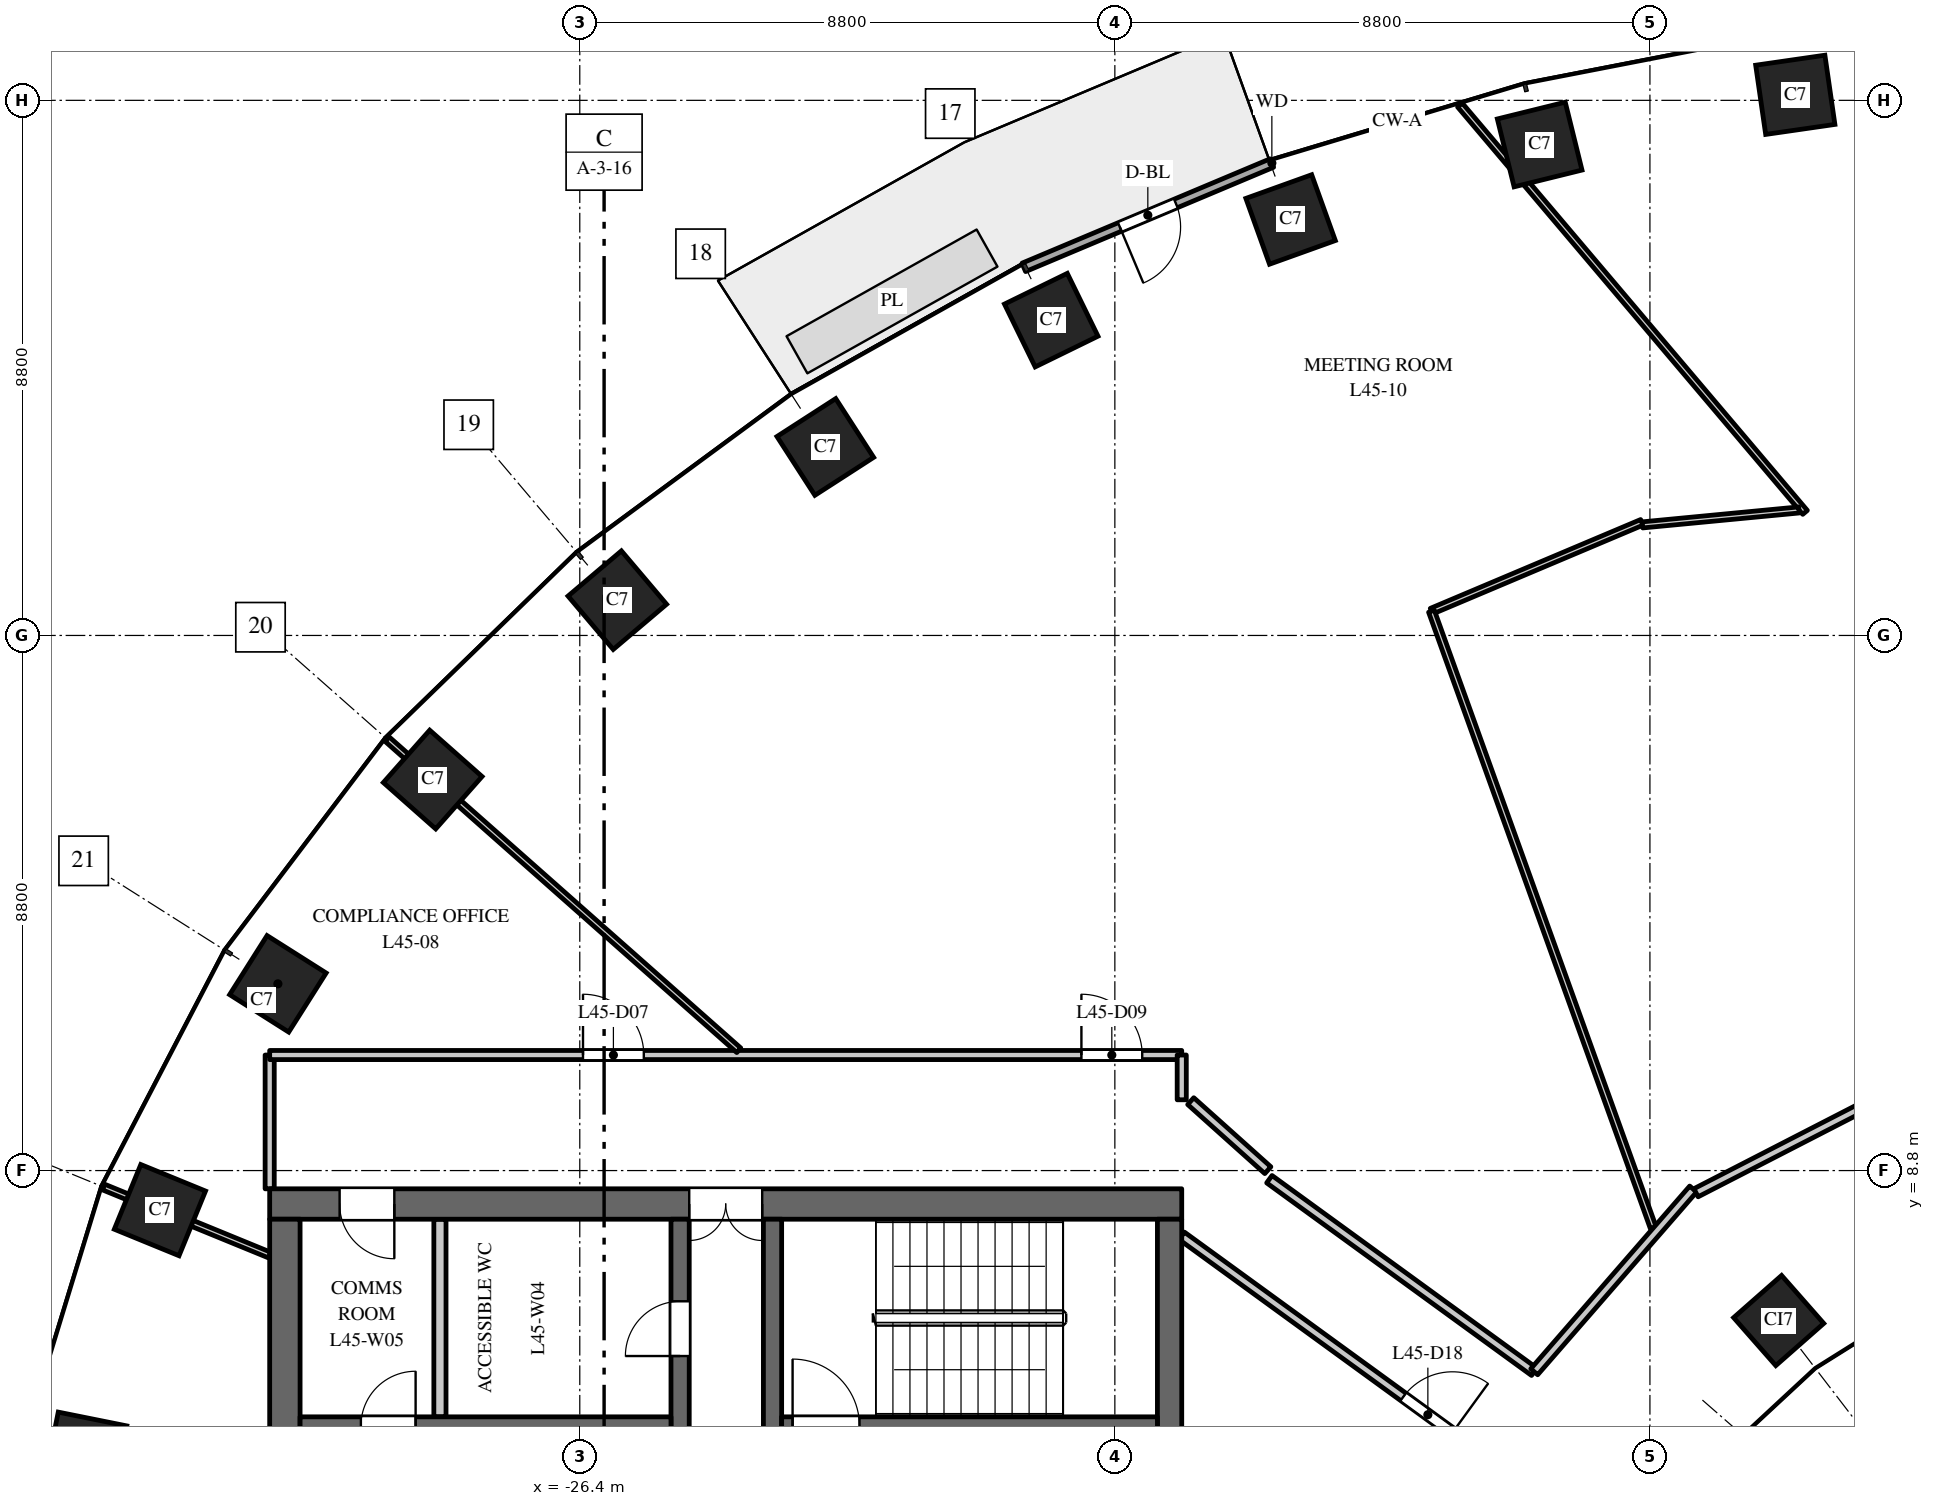
"""IFC4 building model, lengths in metres.
Left out: names, types, materials, properties, quantities, classifications, styles, units other than length and angle.
Written with IfcOpenShell. Run it as: python <this file> out.ifc"""

import sys

from ifc_helpers import new_model, si_unit, direction, frame, frame_2d, origin, origin_2d, place, context, subcontext, project, spatial, rectangle, extrude, element, fill, save


model = new_model("IFC4")
c1 = context("Model", 3, precision=1e-05, world=origin(), true_north=direction((0.0, 1.0)))
c2 = subcontext(c1, "Body", "Model", "MODEL_VIEW")
j1 = project(units=[si_unit("LENGTHUNIT", "METRE"), si_unit("PLANEANGLEUNIT", "RADIAN")], contexts=[c1])
p1 = place(None, origin())
s1 = spatial("IfcSite", under=j1, at=p1, CompositionType="ELEMENT")
p2 = place(p1, origin())
s2 = spatial("IfcBuilding", under=s1, at=p2, CompositionType="ELEMENT")
p3 = place(p2, frame((0.0, 0.0, 194.0)))
s3 = spatial("IfcBuildingStorey", under=s2, at=p3, CompositionType="ELEMENT", Elevation=194.0)
for number, where, z_axis, x_axis in (
    (1, (-6.409, 26.491, 0.0), (0.0, 0.0, 1.0), (-0.99, -0.143, 0.0)),
    (2, (-10.613, 25.674, 0.0), (0.0, 0.0, 1.0), (-0.971, -0.24, 0.0)),
    (3, (-14.709, 24.441, 0.0), (0.0, 0.0, 1.0), (-0.941, -0.338, 0.0)),
    (4, (-18.646, 22.785, 0.0), (0.0, 0.0, 1.0), (-0.898, -0.439, 0.0)),
    (5, (-22.362, 20.7, 0.0), (0.0, 0.0, 1.0), (-0.84, -0.542, 0.0)),
    (6, (-25.783, 18.18, 0.0), (0.0, 0.0, 1.0), (-0.763, -0.646, 0.0)),
    (7, (-28.819, 15.23, 0.0), (0.0, 0.0, 1.0), (-0.663, -0.749, 0.0)),
    (8, (-31.365, 11.871, 0.0), (0.0, 0.0, 1.0), (-0.535, -0.845, 0.0)),
    (9, (-33.305, 8.149, 0.0), (0.0, 0.0, 1.0), (-0.379, -0.925, 0.0)),
    (10, (-34.527, 4.151, 0.0), (0.0, 0.0, 1.0), (-0.197, -0.98, 0.0)),
):
    element("IfcColumn", number, at=place(p3, frame(where, z_axis=z_axis, x_axis=x_axis)), inside=s3, PredefinedType="COLUMN", context=c2, shape_type="SweptSolid", body=[
        extrude(rectangle(XDim=1.15, YDim=1.15, at=origin_2d()), origin(), (0.0, 0.0, 1.0), 4.0),
    ])
p4 = place(p3, frame((-6.682, 6.334, 0.0), z_axis=(0.0, 0.0, 1.0), x_axis=(-0.75102249095, -0.660276622399, 0.0)))
e11 = element("IfcColumn", 11, at=p4, inside=s3, PredefinedType="COLUMN", context=c2, shape_type="SweptSolid", body=[
    extrude(rectangle(XDim=1.05, YDim=1.05, at=origin_2d()), origin(), (0.0, 0.0, 1.0), 4.0),
])
p5 = place(p3, frame((-16.5, 8.25, 0.0), z_axis=(0.0, 0.0, 1.0), x_axis=(-1.0, 0.0, 0.0)))
e12 = element("IfcWall", 12, at=p5, inside=s3, PredefinedType="SHEAR", context=c2, shape_type="SweptSolid", body=[
    extrude(rectangle(XDim=15.0, YDim=0.5, at=frame_2d((7.5, 0.0))), origin(), (0.0, 0.0, 1.0), 3.7),
])
p6 = place(p5, frame((6.9, 0.0, 0.0)))
e13 = element("IfcOpeningElement", 13, at=p6, cuts=e12, PredefinedType="OPENING", context=c2, shape_type="SweptSolid", body=[
    extrude(rectangle(XDim=1.2, YDim=2.1, at=frame_2d((0.6, 1.05))), frame((0.0, 0.26, 0.0), z_axis=(0.0, -1.0, 0.0), x_axis=(1.0, 0.0, 0.0)), (0.0, 0.0, 1.0), 0.52),
])
p7 = place(p5, frame((12.95, 0.0, 0.0)))
e14 = element("IfcOpeningElement", 14, at=p7, cuts=e12, PredefinedType="OPENING", context=c2, shape_type="SweptSolid", body=[
    extrude(rectangle(XDim=0.9, YDim=2.1, at=frame_2d((0.45, 1.05))), frame((0.0, 0.26, 0.0), z_axis=(0.0, -1.0, 0.0), x_axis=(1.0, 0.0, 0.0)), (0.0, 0.0, 1.0), 0.52),
])
p8 = place(p3, frame((-24.75, -8.0, 0.0), z_axis=(0.0, 0.0, 1.0), x_axis=(0.0, 1.0, 0.0)))
e15 = element("IfcWall", 15, at=p8, inside=s3, PredefinedType="SHEAR", context=c2, shape_type="SweptSolid", body=[
    extrude(rectangle(XDim=16.0, YDim=0.3, at=frame_2d((8.0, 0.0))), origin(), (0.0, 0.0, 1.0), 3.7),
])
p9 = place(p8, frame((4.425, 0.0, 0.0)))
e16 = element("IfcOpeningElement", 16, at=p9, cuts=e15, PredefinedType="OPENING", context=c2, shape_type="SweptSolid", body=[
    extrude(rectangle(XDim=1.1, YDim=2.1, at=frame_2d((0.55, 1.05))), frame((0.0, 0.16, 0.0), z_axis=(0.0, -1.0, 0.0), x_axis=(1.0, 0.0, 0.0)), (0.0, 0.0, 1.0), 0.32),
])
p10 = place(p8, frame((7.45, 0.0, 0.0)))
e17 = element("IfcOpeningElement", 17, at=p10, cuts=e15, PredefinedType="OPENING", context=c2, shape_type="SweptSolid", body=[
    extrude(rectangle(XDim=1.1, YDim=2.1, at=frame_2d((0.55, 1.05))), frame((0.0, 0.16, 0.0), z_axis=(0.0, -1.0, 0.0), x_axis=(1.0, 0.0, 0.0)), (0.0, 0.0, 1.0), 0.32),
])
p11 = place(p8, frame((10.475, 0.0, 0.0)))
e18 = element("IfcOpeningElement", 18, at=p11, cuts=e15, PredefinedType="OPENING", context=c2, shape_type="SweptSolid", body=[
    extrude(rectangle(XDim=1.1, YDim=2.1, at=frame_2d((0.55, 1.05))), frame((0.0, 0.16, 0.0), z_axis=(0.0, -1.0, 0.0), x_axis=(1.0, 0.0, 0.0)), (0.0, 0.0, 1.0), 0.32),
])
p12 = place(p8, frame((13.75, 0.0, 0.0)))
e19 = element("IfcOpeningElement", 19, at=p12, cuts=e15, PredefinedType="OPENING", context=c2, shape_type="SweptSolid", body=[
    extrude(rectangle(XDim=0.9, YDim=2.1, at=frame_2d((0.45, 1.05))), frame((0.0, 0.16, 0.0), z_axis=(0.0, -1.0, 0.0), x_axis=(1.0, 0.0, 0.0)), (0.0, 0.0, 1.0), 0.32),
])
p13 = place(p8, frame((1.35, 0.0, 0.0)))
e20 = element("IfcOpeningElement", 20, at=p13, cuts=e15, PredefinedType="OPENING", context=c2, shape_type="SweptSolid", body=[
    extrude(rectangle(XDim=0.9, YDim=2.1, at=frame_2d((0.45, 1.05))), frame((0.0, 0.16, 0.0), z_axis=(0.0, -1.0, 0.0), x_axis=(1.0, 0.0, 0.0)), (0.0, 0.0, 1.0), 0.32),
])
p14 = place(p3, frame((-16.7, -8.0, 0.0), z_axis=(0.0, 0.0, 1.0), x_axis=(0.0, 1.0, 0.0)))
e21 = element("IfcWall", 21, at=p14, inside=s3, PredefinedType="SHEAR", context=c2, shape_type="SweptSolid", body=[
    extrude(rectangle(XDim=16.0, YDim=0.4, at=frame_2d((8.0, 0.0))), origin(), (0.0, 0.0, 1.0), 3.7),
])
p15 = place(p3, frame((-31.25, -8.0, 0.0), z_axis=(0.0, 0.0, 1.0), x_axis=(0.0, 1.0, 0.0)))
e22 = element("IfcWall", 22, at=p15, inside=s3, PredefinedType="SHEAR", context=c2, shape_type="SweptSolid", body=[
    extrude(rectangle(XDim=16.0, YDim=0.5, at=frame_2d((8.0, 0.0))), origin(), (0.0, 0.0, 1.0), 3.7),
])
p16 = place(p3, frame((-24.9, 4.6, 0.0), z_axis=(0.0, 0.0, 1.0), x_axis=(-1.0, 0.0, 0.0)))
e23 = element("IfcWall", 23, at=p16, inside=s3, PredefinedType="SHEAR", context=c2, shape_type="SweptSolid", body=[
    extrude(rectangle(XDim=6.1, YDim=0.3, at=frame_2d((3.05, 0.0))), origin(), (0.0, 0.0, 1.0), 3.7),
])
p17 = place(p16, frame((4.2, 0.0, 0.0)))
e24 = element("IfcOpeningElement", 24, at=p17, cuts=e23, PredefinedType="OPENING", context=c2, shape_type="SweptSolid", body=[
    extrude(rectangle(XDim=0.9, YDim=2.1, at=frame_2d((0.45, 1.05))), frame((0.0, 0.16, 0.0), z_axis=(0.0, -1.0, 0.0), x_axis=(1.0, 0.0, 0.0)), (0.0, 0.0, 1.0), 0.32),
])
p18 = place(p3, frame((-28.7, 4.75, 0.0), z_axis=(0.0, 0.0, 1.0), x_axis=(0.0, 1.0, 0.0)))
e25 = element("IfcWall", 25, at=p18, inside=s3, PredefinedType="PARTITIONING", context=c2, shape_type="SweptSolid", body=[
    extrude(rectangle(XDim=3.25, YDim=0.2, at=frame_2d((1.625, 0.0))), origin(), (0.0, 0.0, 1.0), 3.7),
])
p19 = place(p3, frame((-23.23, 2.25, 0.0), z_axis=(0.0, 0.0, 1.0), x_axis=(0.0, 1.0, 0.0)))
e26 = element("IfcWall", 26, at=p19, inside=s3, PredefinedType="SHEAR", context=c2, shape_type="SweptSolid", body=[
    extrude(rectangle(XDim=5.75, YDim=0.3, at=frame_2d((2.875, 0.0))), origin(), (0.0, 0.0, 1.0), 3.7),
])
p20 = place(p19, frame((0.6, 0.0, 0.0)))
e27 = element("IfcOpeningElement", 27, at=p20, cuts=e26, PredefinedType="OPENING", context=c2, shape_type="SweptSolid", body=[
    extrude(rectangle(XDim=1.0, YDim=2.1, at=frame_2d((0.5, 1.05))), frame((0.0, 0.16, 0.0), z_axis=(0.0, -1.0, 0.0), x_axis=(1.0, 0.0, 0.0)), (0.0, 0.0, 1.0), 0.32),
])
p21 = place(p3, frame((-16.9, 4.6, 0.0), z_axis=(0.0, 0.0, 1.0), x_axis=(-1.0, 0.0, 0.0)))
e28 = element("IfcWall", 28, at=p21, inside=s3, PredefinedType="SHEAR", context=c2, shape_type="SweptSolid", body=[
    extrude(rectangle(XDim=6.18, YDim=0.3, at=frame_2d((3.09, 0.0))), origin(), (0.0, 0.0, 1.0), 3.7),
])
p22 = place(p21, frame((4.9, 0.0, 0.0)))
e29 = element("IfcOpeningElement", 29, at=p22, cuts=e28, PredefinedType="OPENING", context=c2, shape_type="SweptSolid", body=[
    extrude(rectangle(XDim=1.1, YDim=2.1, at=frame_2d((0.55, 1.05))), frame((0.0, 0.16, 0.0), z_axis=(0.0, -1.0, 0.0), x_axis=(1.0, 0.0, 0.0)), (0.0, 0.0, 1.0), 0.32),
])
p23 = place(p3, frame((-15.018, 25.369, 0.0), z_axis=(0.0, 0.0, 1.0), x_axis=(-0.921816985161, -0.387625393736, 0.0)))
e30 = element("IfcWall", 30, at=p23, inside=s3, PredefinedType="STANDARD", context=c2, shape_type="SweptSolid", body=[
    extrude(rectangle(XDim=4.426, YDim=0.15, at=frame_2d((2.213, 0.0))), origin(), (0.0, 0.0, 1.0), 3.7),
])
p24 = place(p23, frame((1.713, 0.0, 0.0)))
e31 = element("IfcOpeningElement", 31, at=p24, cuts=e30, PredefinedType="OPENING", context=c2, shape_type="SweptSolid", body=[
    extrude(rectangle(XDim=1.0, YDim=2.4, at=frame_2d((0.5, 1.2))), frame((0.0, 0.085, 0.0), z_axis=(0.0, -1.0, 0.0), x_axis=(1.0, 0.0, 0.0)), (0.0, 0.0, 1.0), 0.17),
])
p25 = place(p3, frame((-34.234, 8.53, 0.0), z_axis=(0.0, 0.0, 1.0), x_axis=(0.925344112436, -0.379128307542, 0.0)))
e32 = element("IfcWall", 32, at=p25, inside=s3, PredefinedType="PARTITIONING", context=c2, shape_type="SweptSolid", body=[
    extrude(rectangle(XDim=2.954, YDim=0.1, at=frame_2d((1.477, 0.0))), origin(), (0.0, 0.0, 1.0), 2.9),
])
p26 = place(p3, frame((-31.5, 8.5, 0.0), z_axis=(0.0, 0.0, 1.0), x_axis=(0.0, 1.0, 0.0)))
e33 = element("IfcWall", 33, at=p26, inside=s3, PredefinedType="PARTITIONING", context=c2, shape_type="SweptSolid", body=[
    extrude(rectangle(XDim=2.2, YDim=0.15, at=frame_2d((1.1, 0.0))), origin(), (0.0, 0.0, 1.0), 3.7),
])
p27 = place(p3, frame((-31.5, 10.7, 0.0), z_axis=(0.0, 0.0, 1.0), x_axis=(1.0, 0.0, 0.0)))
e34 = element("IfcWall", 34, at=p27, inside=s3, PredefinedType="PARTITIONING", context=c2, shape_type="SweptSolid", body=[
    extrude(rectangle(XDim=15.0, YDim=0.15, at=frame_2d((7.5, 0.0))), origin(), (0.0, 0.0, 1.0), 3.1),
])
p28 = place(p27, frame((5.153, 0.0, 0.0)))
e35 = element("IfcOpeningElement", 35, at=p28, cuts=e34, PredefinedType="OPENING", context=c2, shape_type="SweptSolid", body=[
    extrude(rectangle(XDim=1.0, YDim=2.1, at=frame_2d((0.5, 1.05))), frame((0.0, 0.085, 0.0), z_axis=(0.0, -1.0, 0.0), x_axis=(1.0, 0.0, 0.0)), (0.0, 0.0, 1.0), 0.17),
])
p29 = place(p27, frame((13.35, 0.0, 0.0)))
e36 = element("IfcOpeningElement", 36, at=p29, cuts=e34, PredefinedType="OPENING", context=c2, shape_type="SweptSolid", body=[
    extrude(rectangle(XDim=1.0, YDim=2.1, at=frame_2d((0.5, 1.05))), frame((0.0, 0.085, 0.0), z_axis=(0.0, -1.0, 0.0), x_axis=(1.0, 0.0, 0.0)), (0.0, 0.0, 1.0), 0.17),
])
p30 = place(p3, frame((-29.569, 15.895, 0.0), z_axis=(0.0, 0.0, 1.0), x_axis=(0.748985701008, -0.662586160198, 0.0)))
e37 = element("IfcWall", 37, at=p30, inside=s3, PredefinedType="PARTITIONING", context=c2, shape_type="SweptSolid", body=[
    extrude(rectangle(XDim=7.723, YDim=0.1, at=frame_2d((3.861, 0.0))), origin(), (0.0, 0.0, 1.0), 2.9),
])
p31 = place(p3, frame((-16.5, 9.964, 0.0), z_axis=(0.0, 0.0, 1.0), x_axis=(0.0, 1.0, 0.0)))
e38 = element("IfcWall", 38, at=p31, inside=s3, PredefinedType="PARTITIONING", context=c2, shape_type="SweptSolid", body=[
    extrude(rectangle(XDim=0.736, YDim=0.15, at=frame_2d((0.368, 0.0))), origin(), (0.0, 0.0, 1.0), 3.7),
])
p32 = place(p3, frame((-16.5, 7.727, 0.0), z_axis=(0.0, 0.0, 1.0), x_axis=(0.808900994583, -0.587944879188, 0.0)))
e39 = element("IfcWall", 39, at=p32, inside=s3, PredefinedType="PARTITIONING", context=c2, shape_type="SweptSolid", body=[
    extrude(rectangle(XDim=6.273, YDim=0.15, at=frame_2d((3.136, 0.0))), origin(), (0.0, 0.0, 1.0), 3.7),
])
p33 = place(p32, frame((4.504, 0.0, 0.0)))
e40 = element("IfcOpeningElement", 40, at=p33, cuts=e39, PredefinedType="OPENING", context=c2, shape_type="SweptSolid", body=[
    extrude(rectangle(XDim=1.0, YDim=2.1, at=frame_2d((0.5, 1.05))), frame((0.0, 0.085, 0.0), z_axis=(0.0, -1.0, 0.0), x_axis=(1.0, 0.0, 0.0)), (0.0, 0.0, 1.0), 0.17),
])
p34 = place(p3, frame((-15.059, 8.658, 0.0), z_axis=(0.0, 0.0, 1.0), x_axis=(0.808838005268, -0.588031530816, 0.0)))
e41 = element("IfcWall", 41, at=p34, inside=s3, PredefinedType="PARTITIONING", context=c2, shape_type="SweptSolid", body=[
    extrude(rectangle(XDim=5.386, YDim=0.15, at=frame_2d((2.693, 0.0))), origin(), (0.0, 0.0, 1.0), 3.7),
])
p35 = place(p3, frame((-12.393, 17.999, 0.0), z_axis=(0.0, 0.0, 1.0), x_axis=(0.921243349635, 0.388986748816, 0.0)))
e42 = element("IfcWall", 42, at=p35, inside=s3, PredefinedType="PARTITIONING", context=c2, shape_type="SweptSolid", body=[
    extrude(rectangle(XDim=3.756, YDim=0.1, at=frame_2d((1.878, 0.0))), origin(), (0.0, 0.0, 1.0), 3.7),
])
p36 = place(p3, frame((-12.393, 17.999, 0.0), z_axis=(0.0, 0.0, 1.0), x_axis=(0.338550172492, -0.940948341146, 0.0)))
e43 = element("IfcWall", 43, at=p36, inside=s3, PredefinedType="PARTITIONING", context=c2, shape_type="SweptSolid", body=[
    extrude(rectangle(XDim=10.775, YDim=0.1, at=frame_2d((5.388, 0.0))), origin(), (0.0, 0.0, 1.0), 2.85),
])
p37 = place(p3, frame((-11.925, 26.323, 0.0), z_axis=(0.0, 0.0, 1.0), x_axis=(0.646450651597, -0.762955801505, 0.0)))
e44 = element("IfcWall", 44, at=p37, inside=s3, PredefinedType="PARTITIONING", context=c2, shape_type="SweptSolid", body=[
    extrude(rectangle(XDim=8.78, YDim=0.1, at=frame_2d((4.39, 0.0))), origin(), (0.0, 0.0, 1.0), 2.85),
])
p38 = place(p3, frame((-10.703, 5.491, 0.0), z_axis=(0.0, 0.0, 1.0), x_axis=(0.656266732873, 0.754528975802, 0.0)))
e45 = element("IfcWall", 45, at=p38, inside=s3, PredefinedType="PARTITIONING", context=c2, shape_type="SweptSolid", body=[
    extrude(rectangle(XDim=3.983, YDim=0.15, at=frame_2d((1.991, 0.0))), origin(), (0.0, 0.0, 1.0), 2.75),
])
p39 = place(p3, frame((-8.923, 19.418, 0.0), z_axis=(0.0, 0.0, 1.0), x_axis=(0.995460608392, 0.095174456346, 0.0)))
e46 = element("IfcWall", 46, at=p39, inside=s3, PredefinedType="PARTITIONING", context=c2, shape_type="SweptSolid", body=[
    extrude(rectangle(XDim=2.586, YDim=0.1, at=frame_2d((1.293, 0.0))), origin(), (0.0, 0.0, 1.0), 2.85),
])
p40 = place(p3, frame((-8.042, 8.435, 0.0), z_axis=(0.0, 0.0, 1.0), x_axis=(0.88929925529, 0.457325742268, 0.0)))
e47 = element("IfcWall", 47, at=p40, inside=s3, PredefinedType="PARTITIONING", context=c2, shape_type="SweptSolid", body=[
    extrude(rectangle(XDim=4.459, YDim=0.15, at=frame_2d((2.229, 0.0))), origin(), (0.0, 0.0, 1.0), 2.85),
])
p41 = place(p3, frame((-16.352, 9.942, 0.0), z_axis=(0.0, 0.0, 1.0), x_axis=(0.744832366149, -0.667251636444, 0.0)))
e48 = element("IfcWall", 48, at=p41, inside=s3, PredefinedType="PARTITIONING", context=c2, shape_type="SweptSolid", body=[
    extrude(rectangle(XDim=1.702, YDim=0.15, at=frame_2d((0.851, 0.0))), origin(), (0.0, 0.0, 1.0), 3.7),
])
p42 = place(p22, origin())
e49 = element("IfcDoor", 49, at=p42, inside=s3, OperationType="SINGLE_SWING_RIGHT", PredefinedType="DOOR", context=c2, shape_type="SweptSolid", body=[
    extrude(rectangle(XDim=1.1, YDim=2.1, at=frame_2d((0.55, 1.05))), frame((0.0, 0.025, 0.0), z_axis=(0.0, -1.0, 0.0), x_axis=(1.0, 0.0, 0.0)), (0.0, 0.0, 1.0), 0.05),
])
fill(e29, e49)
p43 = place(p6, origin())
e50 = element("IfcDoor", 50, at=p43, inside=s3, OperationType="DOUBLE_DOOR_DOUBLE_SWING", PredefinedType="DOOR", context=c2, shape_type="SweptSolid", body=[
    extrude(rectangle(XDim=1.2, YDim=2.1, at=frame_2d((0.6, 1.05))), frame((0.0, 0.025, 0.0), z_axis=(0.0, -1.0, 0.0), x_axis=(1.0, 0.0, 0.0)), (0.0, 0.0, 1.0), 0.05),
])
fill(e13, e50)
p44 = place(p12, origin())
e51 = element("IfcDoor", 51, at=p44, inside=s3, OperationType="SINGLE_SWING_RIGHT", PredefinedType="DOOR", context=c2, shape_type="SweptSolid", body=[
    extrude(rectangle(XDim=0.9, YDim=2.1, at=frame_2d((0.45, 1.05))), frame((0.0, 0.025, 0.0), z_axis=(0.0, -1.0, 0.0), x_axis=(1.0, 0.0, 0.0)), (0.0, 0.0, 1.0), 0.05),
])
fill(e19, e51)
p45 = place(p7, origin())
e52 = element("IfcDoor", 52, at=p45, inside=s3, OperationType="SINGLE_SWING_RIGHT", PredefinedType="DOOR", context=c2, shape_type="SweptSolid", body=[
    extrude(rectangle(XDim=0.9, YDim=2.1, at=frame_2d((0.45, 1.05))), frame((0.0, 0.025, 0.0), z_axis=(0.0, -1.0, 0.0), x_axis=(1.0, 0.0, 0.0)), (0.0, 0.0, 1.0), 0.05),
])
fill(e14, e52)
p46 = place(p17, origin())
e53 = element("IfcDoor", 53, at=p46, inside=s3, OperationType="SINGLE_SWING_LEFT", PredefinedType="DOOR", context=c2, shape_type="SweptSolid", body=[
    extrude(rectangle(XDim=0.9, YDim=2.1, at=frame_2d((0.45, 1.05))), frame((0.0, 0.025, 0.0), z_axis=(0.0, -1.0, 0.0), x_axis=(1.0, 0.0, 0.0)), (0.0, 0.0, 1.0), 0.05),
])
fill(e24, e53)
p47 = place(p24, origin())
e54 = element("IfcDoor", 54, at=p47, inside=s3, OperationType="SINGLE_SWING_RIGHT", PredefinedType="DOOR", context=c2, shape_type="SweptSolid", body=[
    extrude(rectangle(XDim=1.0, YDim=2.4, at=frame_2d((0.5, 1.2))), frame((0.0, 0.025, 0.0), z_axis=(0.0, -1.0, 0.0), x_axis=(1.0, 0.0, 0.0)), (0.0, 0.0, 1.0), 0.05),
])
fill(e31, e54)
p48 = place(p28, origin())
e55 = element("IfcDoor", 55, at=p48, inside=s3, OperationType="SINGLE_SWING_LEFT", PredefinedType="DOOR", context=c2, shape_type="SweptSolid", body=[
    extrude(rectangle(XDim=1.0, YDim=2.1, at=frame_2d((0.5, 1.05))), frame((0.0, 0.025, 0.0), z_axis=(0.0, -1.0, 0.0), x_axis=(1.0, 0.0, 0.0)), (0.0, 0.0, 1.0), 0.05),
])
fill(e35, e55)
p49 = place(p29, origin())
e56 = element("IfcDoor", 56, at=p49, inside=s3, OperationType="SINGLE_SWING_LEFT", PredefinedType="DOOR", context=c2, shape_type="SweptSolid", body=[
    extrude(rectangle(XDim=1.0, YDim=2.1, at=frame_2d((0.5, 1.05))), frame((0.0, 0.025, 0.0), z_axis=(0.0, -1.0, 0.0), x_axis=(1.0, 0.0, 0.0)), (0.0, 0.0, 1.0), 0.05),
])
fill(e36, e56)
p50 = place(p33, origin())
e57 = element("IfcDoor", 57, at=p50, inside=s3, OperationType="SINGLE_SWING_RIGHT", PredefinedType="DOOR", context=c2, shape_type="SweptSolid", body=[
    extrude(rectangle(XDim=1.0, YDim=2.1, at=frame_2d((0.5, 1.05))), frame((0.0, 0.025, 0.0), z_axis=(0.0, -1.0, 0.0), x_axis=(1.0, 0.0, 0.0)), (0.0, 0.0, 1.0), 0.05),
])
fill(e40, e57)
save(model, sys.argv[1])
